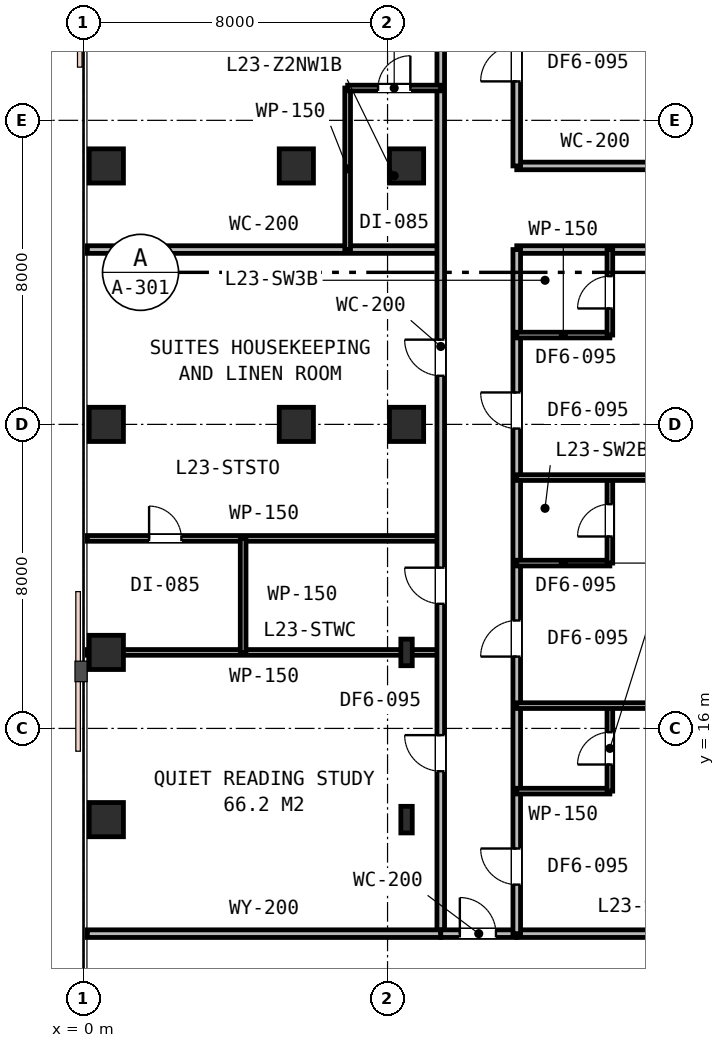
"""IFC4 building model, lengths in metres.
Left out: names, types, materials, properties, quantities, classifications, styles, units other than length and angle.
Written with IfcOpenShell. Run it as: python <this file> out.ifc"""

import sys

from ifc_helpers import new_model, si_unit, direction, frame, frame_2d, origin, origin_2d, place, context, subcontext, project, spatial, rectangle, i_section, extrude, element, fill, save


model = new_model("IFC4")
c1 = context("Model", 3, precision=1e-05, world=origin(), true_north=direction((0.0, 1.0)))
c2 = subcontext(c1, "Body", "Model", "MODEL_VIEW")
j1 = project(units=[si_unit("LENGTHUNIT", "METRE"), si_unit("PLANEANGLEUNIT", "RADIAN")], contexts=[c1])
p1 = place(None, origin())
s1 = spatial("IfcSite", under=j1, at=p1, CompositionType="ELEMENT")
p2 = place(p1, origin())
s2 = spatial("IfcBuilding", under=s1, at=p2, CompositionType="ELEMENT")
p3 = place(p2, frame((0.0, 0.0, 93.6)))
s3 = spatial("IfcBuildingStorey", under=s2, at=p3, CompositionType="ELEMENT", Elevation=93.6)
for number, where, z_axis, x_axis in (
    (1, (8.5, 24.0, 0.0), (0.0, 0.0, 1.0), (1.0, 0.0, 0.0)),
    (2, (5.6, 24.0, 0.0), (0.0, 0.0, 1.0), (1.0, 0.0, 0.0)),
    (3, (5.6, 30.8, 0.0), (0.0, 0.0, 1.0), (1.0, 0.0, 0.0)),
    (4, (8.5, 30.8, 0.0), (0.0, 0.0, 1.0), (1.0, 0.0, 0.0)),
    (5, (0.6, 24.0, 0.0), (0.0, 0.0, 1.0), (1.0, 0.0, 0.0)),
    (6, (0.6, 30.8, 0.0), (0.0, 0.0, 1.0), (1.0, 0.0, 0.0)),
    (7, (0.6, 13.6, 0.0), (0.0, 0.0, 1.0), (1.0, 0.0, 0.0)),
    (8, (0.6, 18.0, 0.0), (0.0, 0.0, 1.0), (1.0, 0.0, 0.0)),
):
    element("IfcColumn", number, at=place(p3, frame(where, z_axis=z_axis, x_axis=x_axis)), inside=s3, PredefinedType="COLUMN", context=c2, shape_type="SweptSolid", body=[
        extrude(rectangle(XDim=0.9, YDim=0.9, at=origin_2d()), origin(), (0.0, 0.0, 1.0), 3.6),
    ])
for number, where, z_axis, x_axis in (
    (9, (8.5, 13.6, 0.0), (0.0, 0.0, 1.0), (1.0, 0.0, 0.0)),
    (10, (8.5, 18.0, 0.0), (0.0, 0.0, 1.0), (1.0, 0.0, 0.0)),
):
    element("IfcColumn", number, at=place(p3, frame(where, z_axis=z_axis, x_axis=x_axis)), inside=s3, PredefinedType="COLUMN", context=c2, shape_type="SweptSolid", body=[
        extrude(i_section(OverallWidth=0.3, OverallDepth=0.7, WebThickness=0.017, FlangeThickness=0.032, FilletRadius=0.027, at=origin_2d()), origin(), (0.0, 0.0, 1.0), 3.6),
    ])
p4 = place(p3, frame((0.1, 28.6, 0.0), z_axis=(0.0, 0.0, 1.0), x_axis=(1.0, 0.0, 0.0)))
e11 = element("IfcWall", 11, at=p4, inside=s3, PredefinedType="PARTITIONING", context=c2, shape_type="SweptSolid", body=[
    extrude(rectangle(XDim=9.3, YDim=0.2, at=frame_2d((4.65, 0.0))), origin(), (0.0, 0.0, 1.0), 2.83),
])
p5 = place(p3, frame((11.4, 28.6, 0.0), z_axis=(0.0, 0.0, 1.0), x_axis=(1.0, 0.0, 0.0)))
e12 = element("IfcWall", 12, at=p5, inside=s3, PredefinedType="PARTITIONING", context=c2, shape_type="SweptSolid", body=[
    extrude(rectangle(XDim=32.8, YDim=0.2, at=frame_2d((16.4, 0.0))), origin(), (0.0, 0.0, 1.0), 2.83),
])
p6 = place(p5, frame((14.7, 0.0, 0.0)))
e13 = element("IfcOpeningElement", 13, at=p6, cuts=e12, PredefinedType="OPENING", context=c2, shape_type="SweptSolid", body=[
    extrude(rectangle(XDim=0.95, YDim=2.15, at=frame_2d((0.475, 1.075))), frame((0.0, 0.11, 0.0), z_axis=(0.0, -1.0, 0.0), x_axis=(1.0, 0.0, 0.0)), (0.0, 0.0, 1.0), 0.22),
])
p7 = place(p5, frame((22.475, 0.0, 0.0)))
e14 = element("IfcOpeningElement", 14, at=p7, cuts=e12, PredefinedType="OPENING", context=c2, shape_type="SweptSolid", body=[
    extrude(rectangle(XDim=0.95, YDim=2.15, at=frame_2d((0.475, 1.075))), frame((0.0, 0.11, 0.0), z_axis=(0.0, -1.0, 0.0), x_axis=(1.0, 0.0, 0.0)), (0.0, 0.0, 1.0), 0.22),
])
p8 = place(p5, frame((28.985, 0.0, 0.0)))
e15 = element("IfcOpeningElement", 15, at=p8, cuts=e12, PredefinedType="OPENING", context=c2, shape_type="SweptSolid", body=[
    extrude(rectangle(XDim=0.95, YDim=2.15, at=frame_2d((0.475, 1.075))), frame((0.0, 0.11, 0.0), z_axis=(0.0, -1.0, 0.0), x_axis=(1.0, 0.0, 0.0)), (0.0, 0.0, 1.0), 0.22),
])
p9 = place(p3, frame((11.4, 30.8, 0.0), z_axis=(0.0, 0.0, 1.0), x_axis=(1.0, 0.0, 0.0)))
e16 = element("IfcWall", 16, at=p9, inside=s3, PredefinedType="PARTITIONING", context=c2, shape_type="SweptSolid", body=[
    extrude(rectangle(XDim=4.13, YDim=0.2, at=frame_2d((2.065, 0.0))), origin(), (0.0, 0.0, 1.0), 2.83),
])
p10 = place(p3, frame((0.1, 18.0, 0.0), z_axis=(0.0, 0.0, 1.0), x_axis=(1.0, 0.0, 0.0)))
e17 = element("IfcWall", 17, at=p10, inside=s3, PredefinedType="PARTITIONING", context=c2, shape_type="SweptSolid", body=[
    extrude(rectangle(XDim=9.3, YDim=0.15, at=frame_2d((4.65, 0.0))), origin(), (0.0, 0.0, 1.0), 2.83),
])
p11 = place(p3, frame((0.1, 21.0, 0.0), z_axis=(0.0, 0.0, 1.0), x_axis=(1.0, 0.0, 0.0)))
e18 = element("IfcWall", 18, at=p11, inside=s3, PredefinedType="PARTITIONING", context=c2, shape_type="SweptSolid", body=[
    extrude(rectangle(XDim=9.3, YDim=0.15, at=frame_2d((4.65, 0.0))), origin(), (0.0, 0.0, 1.0), 2.83),
])
p12 = place(p11, frame((1.625, 0.0, 0.0)))
e19 = element("IfcOpeningElement", 19, at=p12, cuts=e18, PredefinedType="OPENING", context=c2, shape_type="SweptSolid", body=[
    extrude(rectangle(XDim=0.85, YDim=2.15, at=frame_2d((0.425, 1.075))), frame((0.0, 0.085, 0.0), z_axis=(0.0, -1.0, 0.0), x_axis=(1.0, 0.0, 0.0)), (0.0, 0.0, 1.0), 0.17),
])
p13 = place(p3, frame((4.2, 18.0, 0.0), z_axis=(0.0, 0.0, 1.0), x_axis=(0.0, 1.0, 0.0)))
e20 = element("IfcWall", 20, at=p13, inside=s3, PredefinedType="PARTITIONING", context=c2, shape_type="SweptSolid", body=[
    extrude(rectangle(XDim=3.0, YDim=0.15, at=frame_2d((1.5, 0.0))), origin(), (0.0, 0.0, 1.0), 2.83),
])
p14 = place(p3, frame((9.4, 10.6, 0.0), z_axis=(0.0, 0.0, 1.0), x_axis=(0.0, 1.0, 0.0)))
e21 = element("IfcWall", 21, at=p14, inside=s3, PredefinedType="PARTITIONING", context=c2, shape_type="SweptSolid", body=[
    extrude(rectangle(XDim=30.9, YDim=0.2, at=frame_2d((15.45, 0.0))), origin(), (0.0, 0.0, 1.0), 2.83),
])
p15 = place(p14, frame((8.679, 0.0, 0.0)))
e22 = element("IfcOpeningElement", 22, at=p15, cuts=e21, PredefinedType="OPENING", context=c2, shape_type="SweptSolid", body=[
    extrude(rectangle(XDim=0.95, YDim=2.15, at=frame_2d((0.475, 1.075))), frame((0.0, 0.11, 0.0), z_axis=(0.0, -1.0, 0.0), x_axis=(1.0, 0.0, 0.0)), (0.0, 0.0, 1.0), 0.22),
])
p16 = place(p14, frame((14.68, 0.0, 0.0)))
e23 = element("IfcOpeningElement", 23, at=p16, cuts=e21, PredefinedType="OPENING", context=c2, shape_type="SweptSolid", body=[
    extrude(rectangle(XDim=0.95, YDim=2.15, at=frame_2d((0.475, 1.075))), frame((0.0, 0.11, 0.0), z_axis=(0.0, -1.0, 0.0), x_axis=(1.0, 0.0, 0.0)), (0.0, 0.0, 1.0), 0.22),
])
p17 = place(p14, frame((4.273, 0.0, 0.0)))
e24 = element("IfcOpeningElement", 24, at=p17, cuts=e21, PredefinedType="OPENING", context=c2, shape_type="SweptSolid", body=[
    extrude(rectangle(XDim=0.95, YDim=2.15, at=frame_2d((0.475, 1.075))), frame((0.0, 0.11, 0.0), z_axis=(0.0, -1.0, 0.0), x_axis=(1.0, 0.0, 0.0)), (0.0, 0.0, 1.0), 0.22),
])
p18 = place(p14, frame((25.745, 0.0, 0.0)))
e25 = element("IfcOpeningElement", 25, at=p18, cuts=e21, PredefinedType="OPENING", context=c2, shape_type="SweptSolid", body=[
    extrude(rectangle(XDim=0.95, YDim=2.15, at=frame_2d((0.475, 1.075))), frame((0.0, 0.11, 0.0), z_axis=(0.0, -1.0, 0.0), x_axis=(1.0, 0.0, 0.0)), (0.0, 0.0, 1.0), 0.22),
])
p19 = place(p3, frame((6.95, 28.6, 0.0), z_axis=(0.0, 0.0, 1.0), x_axis=(0.0, 1.0, 0.0)))
e26 = element("IfcWall", 26, at=p19, inside=s3, PredefinedType="PARTITIONING", context=c2, shape_type="SweptSolid", body=[
    extrude(rectangle(XDim=4.25, YDim=0.15, at=frame_2d((2.125, 0.0))), origin(), (0.0, 0.0, 1.0), 2.83),
])
p20 = place(p3, frame((6.95, 32.85, 0.0), z_axis=(0.0, 0.0, 1.0), x_axis=(1.0, 0.0, 0.0)))
e27 = element("IfcWall", 27, at=p20, inside=s3, PredefinedType="PARTITIONING", context=c2, shape_type="SweptSolid", body=[
    extrude(rectangle(XDim=2.45, YDim=0.15, at=frame_2d((1.225, 0.0))), origin(), (0.0, 0.0, 1.0), 2.83),
])
p21 = place(p20, frame((0.8, 0.0, 0.0)))
e28 = element("IfcOpeningElement", 28, at=p21, cuts=e27, PredefinedType="OPENING", context=c2, shape_type="SweptSolid", body=[
    extrude(rectangle(XDim=0.85, YDim=2.15, at=frame_2d((0.425, 1.075))), frame((0.0, 0.085, 0.0), z_axis=(0.0, -1.0, 0.0), x_axis=(1.0, 0.0, 0.0)), (0.0, 0.0, 1.0), 0.17),
])
p22 = place(p3, frame((11.4, 30.8, 0.0), z_axis=(0.0, 0.0, 1.0), x_axis=(0.0, 1.0, 0.0)))
e29 = element("IfcWall", 29, at=p22, inside=s3, PredefinedType="PARTITIONING", context=c2, shape_type="SweptSolid", body=[
    extrude(rectangle(XDim=10.7, YDim=0.2, at=frame_2d((5.35, 0.0))), origin(), (0.0, 0.0, 1.0), 2.83),
])
p23 = place(p22, frame((2.225, 0.0, 0.0)))
e30 = element("IfcOpeningElement", 30, at=p23, cuts=e29, PredefinedType="OPENING", context=c2, shape_type="SweptSolid", body=[
    extrude(rectangle(XDim=0.95, YDim=2.15, at=frame_2d((0.475, 1.075))), frame((0.0, 0.11, 0.0), z_axis=(0.0, -1.0, 0.0), x_axis=(1.0, 0.0, 0.0)), (0.0, 0.0, 1.0), 0.22),
])
p24 = place(p22, frame((7.575, 0.0, 0.0)))
e31 = element("IfcOpeningElement", 31, at=p24, cuts=e29, PredefinedType="OPENING", context=c2, shape_type="SweptSolid", body=[
    extrude(rectangle(XDim=0.95, YDim=2.15, at=frame_2d((0.475, 1.075))), frame((0.0, 0.11, 0.0), z_axis=(0.0, -1.0, 0.0), x_axis=(1.0, 0.0, 0.0)), (0.0, 0.0, 1.0), 0.22),
])
p25 = place(p3, frame((0.1, 10.6, 0.0), z_axis=(0.0, 0.0, 1.0), x_axis=(1.0, 0.0, 0.0)))
e32 = element("IfcWall", 32, at=p25, inside=s3, PredefinedType="PARTITIONING", context=c2, shape_type="SweptSolid", body=[
    extrude(rectangle(XDim=9.3, YDim=0.2, at=frame_2d((4.65, 0.0))), origin(), (0.0, 0.0, 1.0), 2.83),
])
p26 = place(p3, frame((11.4, 10.6, 0.0), z_axis=(0.0, 0.0, 1.0), x_axis=(1.0, 0.0, 0.0)))
e33 = element("IfcWall", 33, at=p26, inside=s3, PredefinedType="PARTITIONING", context=c2, shape_type="SweptSolid", body=[
    extrude(rectangle(XDim=12.5, YDim=0.2, at=frame_2d((6.25, 0.0))), origin(), (0.0, 0.0, 1.0), 2.83),
])
p27 = place(p3, frame((9.4, 10.6, 0.0), z_axis=(0.0, 0.0, 1.0), x_axis=(1.0, 0.0, 0.0)))
e34 = element("IfcWall", 34, at=p27, inside=s3, PredefinedType="PARTITIONING", context=c2, shape_type="SweptSolid", body=[
    extrude(rectangle(XDim=2.0, YDim=0.2, at=frame_2d((1.0, 0.0))), origin(), (0.0, 0.0, 1.0), 3.02),
])
p28 = place(p27, frame((0.502, 0.0, 0.0)))
e35 = element("IfcOpeningElement", 35, at=p28, cuts=e34, PredefinedType="OPENING", context=c2, shape_type="SweptSolid", body=[
    extrude(rectangle(XDim=0.95, YDim=2.15, at=frame_2d((0.475, 1.075))), frame((0.0, 0.11, 0.0), z_axis=(0.0, -1.0, 0.0), x_axis=(1.0, 0.0, 0.0)), (0.0, 0.0, 1.0), 0.22),
])
p29 = place(p3, frame((11.4, 10.6, 0.0), z_axis=(0.0, 0.0, 1.0), x_axis=(0.0, 1.0, 0.0)))
e36 = element("IfcWall", 36, at=p29, inside=s3, PredefinedType="PARTITIONING", context=c2, shape_type="SweptSolid", body=[
    extrude(rectangle(XDim=18.0, YDim=0.2, at=frame_2d((9.0, 0.0))), origin(), (0.0, 0.0, 1.0), 2.83),
])
p30 = place(p29, frame((1.29, 0.0, 0.0)))
e37 = element("IfcOpeningElement", 37, at=p30, cuts=e36, PredefinedType="OPENING", context=c2, shape_type="SweptSolid", body=[
    extrude(rectangle(XDim=0.95, YDim=2.15, at=frame_2d((0.475, 1.075))), frame((0.0, 0.11, 0.0), z_axis=(0.0, -1.0, 0.0), x_axis=(1.0, 0.0, 0.0)), (0.0, 0.0, 1.0), 0.22),
])
p31 = place(p29, frame((7.29, 0.0, 0.0)))
e38 = element("IfcOpeningElement", 38, at=p31, cuts=e36, PredefinedType="OPENING", context=c2, shape_type="SweptSolid", body=[
    extrude(rectangle(XDim=0.95, YDim=2.15, at=frame_2d((0.475, 1.075))), frame((0.0, 0.11, 0.0), z_axis=(0.0, -1.0, 0.0), x_axis=(1.0, 0.0, 0.0)), (0.0, 0.0, 1.0), 0.22),
])
p32 = place(p29, frame((13.29, 0.0, 0.0)))
e39 = element("IfcOpeningElement", 39, at=p32, cuts=e36, PredefinedType="OPENING", context=c2, shape_type="SweptSolid", body=[
    extrude(rectangle(XDim=0.95, YDim=2.15, at=frame_2d((0.475, 1.075))), frame((0.0, 0.11, 0.0), z_axis=(0.0, -1.0, 0.0), x_axis=(1.0, 0.0, 0.0)), (0.0, 0.0, 1.0), 0.22),
])
p33 = place(p3, frame((11.4, 14.35, 0.0), z_axis=(0.0, 0.0, 1.0), x_axis=(1.0, 0.0, 0.0)))
e40 = element("IfcWall", 40, at=p33, inside=s3, PredefinedType="PARTITIONING", context=c2, shape_type="SweptSolid", body=[
    extrude(rectangle(XDim=2.45, YDim=0.15, at=frame_2d((1.225, 0.0))), origin(), (0.0, 0.0, 1.0), 3.02),
])
p34 = place(p3, frame((13.85, 14.35, 0.0), z_axis=(0.0, 0.0, 1.0), x_axis=(0.0, 1.0, 0.0)))
e41 = element("IfcWall", 41, at=p34, inside=s3, PredefinedType="PARTITIONING", context=c2, shape_type="SweptSolid", body=[
    extrude(rectangle(XDim=2.25, YDim=0.15, at=frame_2d((1.125, 0.0))), origin(), (0.0, 0.0, 1.0), 3.02),
])
p35 = place(p34, frame((0.7, 0.0, 0.0)))
e42 = element("IfcOpeningElement", 42, at=p35, cuts=e41, PredefinedType="OPENING", context=c2, shape_type="SweptSolid", body=[
    extrude(rectangle(XDim=0.85, YDim=2.15, at=frame_2d((0.425, 1.075))), frame((0.0, 0.085, 0.0), z_axis=(0.0, -1.0, 0.0), x_axis=(1.0, 0.0, 0.0)), (0.0, 0.0, 1.0), 0.17),
])
p36 = place(p3, frame((11.4, 16.6, 0.0), z_axis=(0.0, 0.0, 1.0), x_axis=(1.0, 0.0, 0.0)))
e43 = element("IfcWall", 43, at=p36, inside=s3, PredefinedType="PARTITIONING", context=c2, shape_type="SweptSolid", body=[
    extrude(rectangle(XDim=12.5, YDim=0.15, at=frame_2d((6.25, 0.0))), origin(), (0.0, 0.0, 1.0), 2.83),
])
p37 = place(p3, frame((11.4, 20.35, 0.0), z_axis=(0.0, 0.0, 1.0), x_axis=(1.0, 0.0, 0.0)))
e44 = element("IfcWall", 44, at=p37, inside=s3, PredefinedType="PARTITIONING", context=c2, shape_type="SweptSolid", body=[
    extrude(rectangle(XDim=2.45, YDim=0.15, at=frame_2d((1.225, 0.0))), origin(), (0.0, 0.0, 1.0), 3.33),
])
p38 = place(p3, frame((13.85, 20.35, 0.0), z_axis=(0.0, 0.0, 1.0), x_axis=(0.0, 1.0, 0.0)))
e45 = element("IfcWall", 45, at=p38, inside=s3, PredefinedType="PARTITIONING", context=c2, shape_type="SweptSolid", body=[
    extrude(rectangle(XDim=2.25, YDim=0.15, at=frame_2d((1.125, 0.0))), origin(), (0.0, 0.0, 1.0), 3.33),
])
p39 = place(p38, frame((0.7, 0.0, 0.0)))
e46 = element("IfcOpeningElement", 46, at=p39, cuts=e45, PredefinedType="OPENING", context=c2, shape_type="SweptSolid", body=[
    extrude(rectangle(XDim=0.85, YDim=2.15, at=frame_2d((0.425, 1.075))), frame((0.0, 0.085, 0.0), z_axis=(0.0, -1.0, 0.0), x_axis=(1.0, 0.0, 0.0)), (0.0, 0.0, 1.0), 0.17),
])
p40 = place(p3, frame((11.4, 22.6, 0.0), z_axis=(0.0, 0.0, 1.0), x_axis=(1.0, 0.0, 0.0)))
e47 = element("IfcWall", 47, at=p40, inside=s3, PredefinedType="PARTITIONING", context=c2, shape_type="SweptSolid", body=[
    extrude(rectangle(XDim=12.5, YDim=0.15, at=frame_2d((6.25, 0.0))), origin(), (0.0, 0.0, 1.0), 2.83),
])
p41 = place(p3, frame((11.4, 26.35, 0.0), z_axis=(0.0, 0.0, 1.0), x_axis=(1.0, 0.0, 0.0)))
e48 = element("IfcWall", 48, at=p41, inside=s3, PredefinedType="PARTITIONING", context=c2, shape_type="SweptSolid", body=[
    extrude(rectangle(XDim=2.45, YDim=0.15, at=frame_2d((1.225, 0.0))), origin(), (0.0, 0.0, 1.0), 3.33),
])
p42 = place(p3, frame((13.85, 26.35, 0.0), z_axis=(0.0, 0.0, 1.0), x_axis=(0.0, 1.0, 0.0)))
e49 = element("IfcWall", 49, at=p42, inside=s3, PredefinedType="PARTITIONING", context=c2, shape_type="SweptSolid", body=[
    extrude(rectangle(XDim=2.25, YDim=0.15, at=frame_2d((1.125, 0.0))), origin(), (0.0, 0.0, 1.0), 3.33),
])
p43 = place(p42, frame((0.7, 0.0, 0.0)))
e50 = element("IfcOpeningElement", 50, at=p43, cuts=e49, PredefinedType="OPENING", context=c2, shape_type="SweptSolid", body=[
    extrude(rectangle(XDim=0.85, YDim=2.15, at=frame_2d((0.425, 1.075))), frame((0.0, 0.085, 0.0), z_axis=(0.0, -1.0, 0.0), x_axis=(1.0, 0.0, 0.0)), (0.0, 0.0, 1.0), 0.17),
])
p44 = place(p15, origin())
e51 = element("IfcDoor", 51, at=p44, inside=s3, OperationType="SINGLE_SWING_RIGHT", PredefinedType="DOOR", context=c2, shape_type="SweptSolid", body=[
    extrude(rectangle(XDim=0.95, YDim=2.15, at=frame_2d((0.475, 1.075))), frame((0.0, 0.025, 0.0), z_axis=(0.0, -1.0, 0.0), x_axis=(1.0, 0.0, 0.0)), (0.0, 0.0, 1.0), 0.05),
])
fill(e22, e51)
p45 = place(p12, origin())
e52 = element("IfcDoor", 52, at=p45, inside=s3, OperationType="SINGLE_SWING_LEFT", PredefinedType="DOOR", context=c2, shape_type="SweptSolid", body=[
    extrude(rectangle(XDim=0.85, YDim=2.15, at=frame_2d((0.425, 1.075))), frame((0.0, 0.025, 0.0), z_axis=(0.0, -1.0, 0.0), x_axis=(1.0, 0.0, 0.0)), (0.0, 0.0, 1.0), 0.05),
])
fill(e19, e52)
p46 = place(p16, origin())
e53 = element("IfcDoor", 53, at=p46, inside=s3, OperationType="SINGLE_SWING_RIGHT", PredefinedType="DOOR", context=c2, shape_type="SweptSolid", body=[
    extrude(rectangle(XDim=0.95, YDim=2.15, at=frame_2d((0.475, 1.075))), frame((0.0, 0.025, 0.0), z_axis=(0.0, -1.0, 0.0), x_axis=(1.0, 0.0, 0.0)), (0.0, 0.0, 1.0), 0.05),
])
fill(e23, e53)
p47 = place(p17, origin())
e54 = element("IfcDoor", 54, at=p47, inside=s3, OperationType="SINGLE_SWING_RIGHT", PredefinedType="DOOR", context=c2, shape_type="SweptSolid", body=[
    extrude(rectangle(XDim=0.95, YDim=2.15, at=frame_2d((0.475, 1.075))), frame((0.0, 0.025, 0.0), z_axis=(0.0, -1.0, 0.0), x_axis=(1.0, 0.0, 0.0)), (0.0, 0.0, 1.0), 0.05),
])
fill(e24, e54)
p48 = place(p21, origin())
e55 = element("IfcDoor", 55, at=p48, inside=s3, OperationType="SINGLE_SWING_RIGHT", PredefinedType="DOOR", context=c2, shape_type="SweptSolid", body=[
    extrude(rectangle(XDim=0.85, YDim=2.15, at=frame_2d((0.425, 1.075))), frame((0.0, 0.025, 0.0), z_axis=(0.0, -1.0, 0.0), x_axis=(1.0, 0.0, 0.0)), (0.0, 0.0, 1.0), 0.05),
])
fill(e28, e55)
p49 = place(p23, origin())
e56 = element("IfcDoor", 56, at=p49, inside=s3, OperationType="SINGLE_SWING_LEFT", PredefinedType="DOOR", context=c2, shape_type="SweptSolid", body=[
    extrude(rectangle(XDim=0.95, YDim=2.15, at=frame_2d((0.475, 1.075))), frame((0.0, 0.025, 0.0), z_axis=(0.0, -1.0, 0.0), x_axis=(1.0, 0.0, 0.0)), (0.0, 0.0, 1.0), 0.05),
])
fill(e30, e56)
p50 = place(p28, origin())
e57 = element("IfcDoor", 57, at=p50, inside=s3, OperationType="SINGLE_SWING_LEFT", PredefinedType="DOOR", context=c2, shape_type="SweptSolid", body=[
    extrude(rectangle(XDim=0.95, YDim=2.15, at=frame_2d((0.475, 1.075))), frame((0.0, 0.025, 0.0), z_axis=(0.0, -1.0, 0.0), x_axis=(1.0, 0.0, 0.0)), (0.0, 0.0, 1.0), 0.05),
])
fill(e35, e57)
p51 = place(p30, origin())
e58 = element("IfcDoor", 58, at=p51, inside=s3, OperationType="SINGLE_SWING_RIGHT", PredefinedType="DOOR", context=c2, shape_type="SweptSolid", body=[
    extrude(rectangle(XDim=0.95, YDim=2.15, at=frame_2d((0.475, 1.075))), frame((0.0, 0.025, 0.0), z_axis=(0.0, -1.0, 0.0), x_axis=(1.0, 0.0, 0.0)), (0.0, 0.0, 1.0), 0.05),
])
fill(e37, e58)
p52 = place(p35, origin())
e59 = element("IfcDoor", 59, at=p52, inside=s3, OperationType="SINGLE_SWING_LEFT", PredefinedType="DOOR", context=c2, shape_type="SweptSolid", body=[
    extrude(rectangle(XDim=0.85, YDim=2.15, at=frame_2d((0.425, 1.075))), frame((0.0, 0.025, 0.0), z_axis=(0.0, -1.0, 0.0), x_axis=(1.0, 0.0, 0.0)), (0.0, 0.0, 1.0), 0.05),
])
fill(e42, e59)
p53 = place(p31, origin())
e60 = element("IfcDoor", 60, at=p53, inside=s3, OperationType="SINGLE_SWING_LEFT", PredefinedType="DOOR", context=c2, shape_type="SweptSolid", body=[
    extrude(rectangle(XDim=0.95, YDim=2.15, at=frame_2d((0.475, 1.075))), frame((0.0, 0.025, 0.0), z_axis=(0.0, -1.0, 0.0), x_axis=(1.0, 0.0, 0.0)), (0.0, 0.0, 1.0), 0.05),
])
fill(e38, e60)
p54 = place(p39, origin())
e61 = element("IfcDoor", 61, at=p54, inside=s3, OperationType="SINGLE_SWING_LEFT", PredefinedType="DOOR", context=c2, shape_type="SweptSolid", body=[
    extrude(rectangle(XDim=0.85, YDim=2.15, at=frame_2d((0.425, 1.075))), frame((0.0, 0.025, 0.0), z_axis=(0.0, -1.0, 0.0), x_axis=(1.0, 0.0, 0.0)), (0.0, 0.0, 1.0), 0.05),
])
fill(e46, e61)
p55 = place(p32, origin())
e62 = element("IfcDoor", 62, at=p55, inside=s3, OperationType="SINGLE_SWING_RIGHT", PredefinedType="DOOR", context=c2, shape_type="SweptSolid", body=[
    extrude(rectangle(XDim=0.95, YDim=2.15, at=frame_2d((0.475, 1.075))), frame((0.0, 0.025, 0.0), z_axis=(0.0, -1.0, 0.0), x_axis=(1.0, 0.0, 0.0)), (0.0, 0.0, 1.0), 0.05),
])
fill(e39, e62)
p56 = place(p43, origin())
e63 = element("IfcDoor", 63, at=p56, inside=s3, OperationType="SINGLE_SWING_LEFT", PredefinedType="DOOR", context=c2, shape_type="SweptSolid", body=[
    extrude(rectangle(XDim=0.85, YDim=2.15, at=frame_2d((0.425, 1.075))), frame((0.0, 0.025, 0.0), z_axis=(0.0, -1.0, 0.0), x_axis=(1.0, 0.0, 0.0)), (0.0, 0.0, 1.0), 0.05),
])
fill(e50, e63)
save(model, sys.argv[1])
